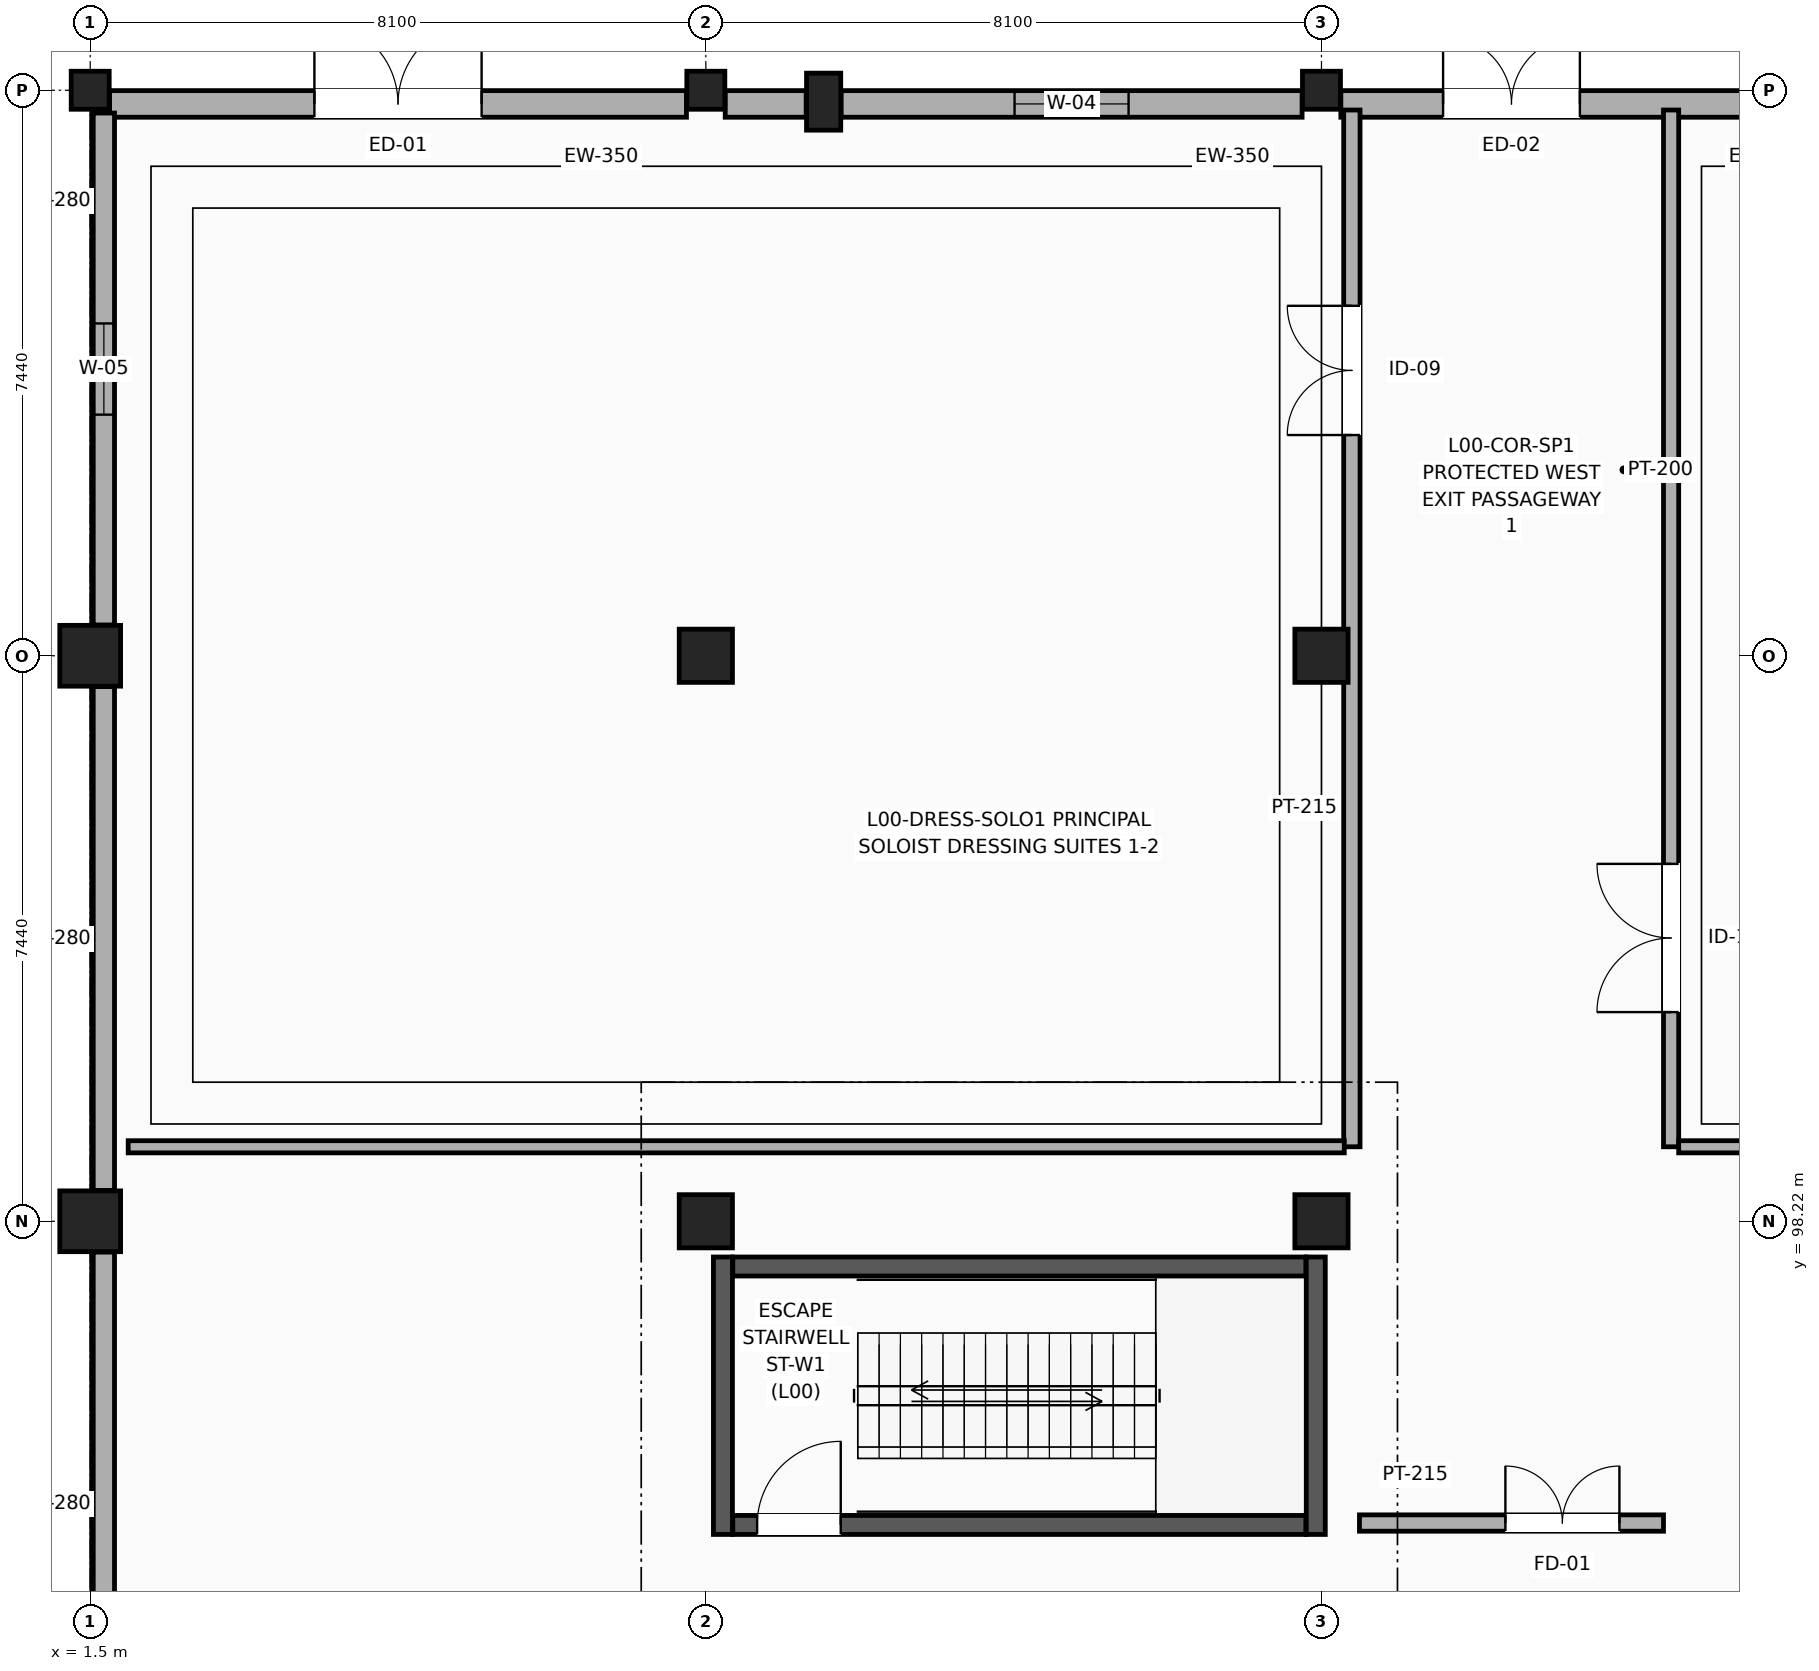
"""IFC4 building model, lengths in metres.
Left out: names, types, materials, properties, quantities, classifications, styles, units other than length and angle.
Written with IfcOpenShell. Run it as: python <this file> out.ifc"""

import sys

from ifc_helpers import new_model, si_unit, direction, frame, frame_2d, origin, origin_2d, place, context, subcontext, project, spatial, rectangle, extrude, element, fill, save


model = new_model("IFC4")
c1 = context("Model", 3, precision=1e-05, world=origin(), true_north=direction((0.0, 1.0)))
c2 = subcontext(c1, "Body", "Model", "MODEL_VIEW")
j1 = project(units=[si_unit("LENGTHUNIT", "METRE"), si_unit("PLANEANGLEUNIT", "RADIAN")], contexts=[c1])
p1 = place(None, origin())
s1 = spatial("IfcSite", under=j1, at=p1, CompositionType="ELEMENT")
p2 = place(p1, origin())
s2 = spatial("IfcBuilding", under=s1, at=p2, CompositionType="ELEMENT")
p3 = place(p2, origin())
s3 = spatial("IfcBuildingStorey", under=s2, at=p3, CompositionType="ELEMENT", Elevation=0.0)
p4 = place(p3, frame((11.15, 112.95, 0.0), z_axis=(0.0, 0.0, 1.0), x_axis=(1.0, 0.0, 0.0)))
e1 = element("IfcColumn", 1, at=p4, inside=s3, PredefinedType="PILASTER", context=c2, shape_type="SweptSolid", body=[
    extrude(rectangle(XDim=0.45, YDim=0.75, at=origin_2d()), origin(), (0.0, 0.0, 1.0), 5.4),
])
for number, where, z_axis, x_axis in (
    (2, (1.5, 98.22, 0.0), (0.0, 0.0, 1.0), (1.0, 0.0, 0.0)),
    (3, (1.5, 105.66, 0.0), (0.0, 0.0, 1.0), (1.0, 0.0, 0.0)),
):
    element("IfcColumn", number, at=place(p3, frame(where, z_axis=z_axis, x_axis=x_axis)), inside=s3, PredefinedType="COLUMN", context=c2, shape_type="SweptSolid", body=[
        extrude(rectangle(XDim=0.8, YDim=0.8, at=origin_2d()), origin(), (0.0, 0.0, 1.0), 5.4),
    ])
p5 = place(p3, frame((1.5, 113.1, 0.0), z_axis=(0.0, 0.0, 1.0), x_axis=(1.0, 0.0, 0.0)))
e4 = element("IfcColumn", 4, at=p5, inside=s3, PredefinedType="COLUMN", context=c2, shape_type="SweptSolid", body=[
    extrude(rectangle(XDim=0.5, YDim=0.5, at=origin_2d()), origin(), (0.0, 0.0, 1.0), 5.4),
])
for number, where, z_axis, x_axis in (
    (5, (9.6, 98.22, 0.0), (0.0, 0.0, 1.0), (1.0, 0.0, 0.0)),
    (6, (9.6, 105.66, 0.0), (0.0, 0.0, 1.0), (1.0, 0.0, 0.0)),
):
    element("IfcColumn", number, at=place(p3, frame(where, z_axis=z_axis, x_axis=x_axis)), inside=s3, PredefinedType="COLUMN", context=c2, shape_type="SweptSolid", body=[
        extrude(rectangle(XDim=0.7, YDim=0.7, at=origin_2d()), origin(), (0.0, 0.0, 1.0), 5.4),
    ])
p6 = place(p3, frame((9.6, 113.1, 0.0), z_axis=(0.0, 0.0, 1.0), x_axis=(1.0, 0.0, 0.0)))
e7 = element("IfcColumn", 7, at=p6, inside=s3, PredefinedType="COLUMN", context=c2, shape_type="SweptSolid", body=[
    extrude(rectangle(XDim=0.5, YDim=0.5, at=origin_2d()), origin(), (0.0, 0.0, 1.0), 5.4),
])
for number, where, z_axis, x_axis in (
    (8, (17.7, 98.22, 0.0), (0.0, 0.0, 1.0), (1.0, 0.0, 0.0)),
    (9, (17.7, 105.66, 0.0), (0.0, 0.0, 1.0), (1.0, 0.0, 0.0)),
):
    element("IfcColumn", number, at=place(p3, frame(where, z_axis=z_axis, x_axis=x_axis)), inside=s3, PredefinedType="COLUMN", context=c2, shape_type="SweptSolid", body=[
        extrude(rectangle(XDim=0.7, YDim=0.7, at=origin_2d()), origin(), (0.0, 0.0, 1.0), 5.4),
    ])
p7 = place(p3, frame((17.7, 113.1, 0.0), z_axis=(0.0, 0.0, 1.0), x_axis=(1.0, 0.0, 0.0)))
e10 = element("IfcColumn", 10, at=p7, inside=s3, PredefinedType="COLUMN", context=c2, shape_type="SweptSolid", body=[
    extrude(rectangle(XDim=0.5, YDim=0.5, at=origin_2d()), origin(), (0.0, 0.0, 1.0), 5.4),
])
p8 = place(p3, frame((1.755, 112.92, 0.0), z_axis=(0.0, 0.0, 1.0), x_axis=(1.0, 0.0, 0.0)))
e11 = element("IfcWall", 11, at=p8, inside=s3, PredefinedType="SOLIDWALL", context=c2, shape_type="SweptSolid", body=[
    extrude(rectangle(XDim=7.59, YDim=0.35, at=frame_2d((3.795, 0.0))), origin(), (0.0, 0.0, 1.0), 4.137),
])
p9 = place(p8, frame((2.695, 0.0, 0.0)))
e12 = element("IfcOpeningElement", 12, at=p9, cuts=e11, PredefinedType="OPENING", context=c2, shape_type="SweptSolid", body=[
    extrude(rectangle(XDim=2.2, YDim=2.6, at=frame_2d((1.1, 1.3))), frame((0.0, 0.185, 0.0), z_axis=(0.0, -1.0, 0.0), x_axis=(1.0, 0.0, 0.0)), (0.0, 0.0, 1.0), 0.37),
])
p10 = place(p3, frame((11.38, 112.92, 0.0), z_axis=(0.0, 0.0, 1.0), x_axis=(1.0, 0.0, 0.0)))
e13 = element("IfcWall", 13, at=p10, inside=s3, PredefinedType="SOLIDWALL", context=c2, shape_type="SweptSolid", body=[
    extrude(rectangle(XDim=6.065, YDim=0.35, at=frame_2d((3.033, 0.0))), origin(), (0.0, 0.0, 1.0), 4.137),
])
p11 = place(p10, frame((2.282, 0.0, 0.9)))
e14 = element("IfcOpeningElement", 14, at=p11, cuts=e13, PredefinedType="OPENING", context=c2, shape_type="SweptSolid", body=[
    extrude(rectangle(XDim=1.5, YDim=1.8, at=frame_2d((0.75, 0.9))), frame((0.0, 0.185, 0.0), z_axis=(0.0, -1.0, 0.0), x_axis=(1.0, 0.0, 0.0)), (0.0, 0.0, 1.0), 0.37),
])
p12 = place(p3, frame((9.855, 112.92, 0.0), z_axis=(0.0, 0.0, 1.0), x_axis=(1.0, 0.0, 0.0)))
e15 = element("IfcWall", 15, at=p12, inside=s3, PredefinedType="SOLIDWALL", context=c2, shape_type="SweptSolid", body=[
    extrude(rectangle(XDim=1.065, YDim=0.35, at=frame_2d((0.532, 0.0))), origin(), (0.0, 0.0, 1.0), 4.137),
])
p13 = place(p3, frame((17.955, 112.92, 0.0), z_axis=(0.0, 0.0, 1.0), x_axis=(1.0, 0.0, 0.0)))
e16 = element("IfcWall", 16, at=p13, inside=s3, PredefinedType="SOLIDWALL", context=c2, shape_type="SweptSolid", body=[
    extrude(rectangle(XDim=7.59, YDim=0.35, at=frame_2d((3.795, 0.0))), origin(), (0.0, 0.0, 1.0), 4.137),
])
p14 = place(p13, frame((1.345, 0.0, 0.0)))
e17 = element("IfcOpeningElement", 17, at=p14, cuts=e16, PredefinedType="OPENING", context=c2, shape_type="SweptSolid", body=[
    extrude(rectangle(XDim=1.8, YDim=2.4, at=frame_2d((0.9, 1.2))), frame((0.0, 0.185, 0.0), z_axis=(0.0, -1.0, 0.0), x_axis=(1.0, 0.0, 0.0)), (0.0, 0.0, 1.0), 0.37),
])
for number, where, z_axis, x_axis in (
    (18, (1.68, 91.185, 0.0), (0.0, 0.0, 1.0), (0.0, 1.0, 0.0)),
    (19, (1.68, 98.625, 0.0), (0.0, 0.0, 1.0), (0.0, 1.0, 0.0)),
):
    element("IfcWall", number, at=place(p3, frame(where, z_axis=z_axis, x_axis=x_axis)), inside=s3, PredefinedType="SOLIDWALL", context=c2, shape_type="SweptSolid", body=[
        extrude(rectangle(XDim=6.63, YDim=0.28, at=frame_2d((3.315, 0.0))), origin(), (0.0, 0.0, 1.0), 4.787),
    ])
p15 = place(p3, frame((1.68, 106.065, 0.0), z_axis=(0.0, 0.0, 1.0), x_axis=(0.0, 1.0, 0.0)))
e20 = element("IfcWall", 20, at=p15, inside=s3, PredefinedType="SOLIDWALL", context=c2, shape_type="SweptSolid", body=[
    extrude(rectangle(XDim=6.735, YDim=0.28, at=frame_2d((3.368, 0.0))), origin(), (0.0, 0.0, 1.0), 4.787),
])
p16 = place(p15, frame((2.767, 0.0, 0.95)))
e21 = element("IfcOpeningElement", 21, at=p16, cuts=e20, PredefinedType="OPENING", context=c2, shape_type="SweptSolid", body=[
    extrude(rectangle(XDim=1.2, YDim=1.8, at=frame_2d((0.6, 0.9))), frame((0.0, 0.15, 0.0), z_axis=(0.0, -1.0, 0.0), x_axis=(1.0, 0.0, 0.0)), (0.0, 0.0, 1.0), 0.3),
])
p17 = place(p3, frame((9.955, 94.225, 0.0), z_axis=(0.0, 0.0, 1.0), x_axis=(1.0, 0.0, 0.0)))
e22 = element("IfcWall", 22, at=p17, inside=s3, PredefinedType="SHEAR", context=c2, shape_type="SweptSolid", body=[
    extrude(rectangle(XDim=7.54, YDim=0.25, at=frame_2d((3.77, 0.0))), origin(), (0.0, 0.0, 1.0), 5.105),
])
p18 = place(p17, frame((0.32, 0.0, 0.0)))
e23 = element("IfcOpeningElement", 23, at=p18, cuts=e22, PredefinedType="OPENING", context=c2, shape_type="SweptSolid", body=[
    extrude(rectangle(XDim=1.1, YDim=2.2, at=frame_2d((0.55, 1.1))), frame((0.0, 0.135, 0.0), z_axis=(0.0, -1.0, 0.0), x_axis=(1.0, 0.0, 0.0)), (0.0, 0.0, 1.0), 0.27),
])
p19 = place(p3, frame((9.955, 97.625, 0.0), z_axis=(0.0, 0.0, 1.0), x_axis=(1.0, 0.0, 0.0)))
e24 = element("IfcWall", 24, at=p19, inside=s3, PredefinedType="SHEAR", context=c2, shape_type="SweptSolid", body=[
    extrude(rectangle(XDim=7.54, YDim=0.25, at=frame_2d((3.77, 0.0))), origin(), (0.0, 0.0, 1.0), 5.105),
])
for number, where, z_axis, x_axis in (
    (25, (9.825, 94.1, 0.0), (0.0, 0.0, 1.0), (0.0, 1.0, 0.0)),
    (26, (17.625, 94.1, 0.0), (0.0, 0.0, 1.0), (0.0, 1.0, 0.0)),
):
    element("IfcWall", number, at=place(p3, frame(where, z_axis=z_axis, x_axis=x_axis)), inside=s3, PredefinedType="SHEAR", context=c2, shape_type="SweptSolid", body=[
        extrude(rectangle(XDim=3.65, YDim=0.25, at=frame_2d((1.825, 0.0))), origin(), (0.0, 0.0, 1.0), 5.105),
    ])
p20 = place(p3, frame((18.2, 94.25, 0.0), z_axis=(0.0, 0.0, 1.0), x_axis=(1.0, 0.0, 0.0)))
e27 = element("IfcWall", 27, at=p20, inside=s3, PredefinedType="PARTITIONING", context=c2, shape_type="SweptSolid", body=[
    extrude(rectangle(XDim=4.0, YDim=0.215, at=frame_2d((2.0, 0.0))), origin(), (0.0, 0.0, 1.0), 4.637),
])
p21 = place(p20, frame((1.92, 0.0, 0.0)))
e28 = element("IfcOpeningElement", 28, at=p21, cuts=e27, PredefinedType="OPENING", context=c2, shape_type="SweptSolid", body=[
    extrude(rectangle(XDim=1.5, YDim=2.2, at=frame_2d((0.75, 1.1))), frame((0.0, 0.117, 0.0), z_axis=(0.0, -1.0, 0.0), x_axis=(1.0, 0.0, 0.0)), (0.0, 0.0, 1.0), 0.235),
])
p22 = place(p3, frame((18.1, 99.2, 0.0), z_axis=(0.0, 0.0, 1.0), x_axis=(0.0, 1.0, 0.0)))
e29 = element("IfcWall", 29, at=p22, inside=s3, PredefinedType="PARTITIONING", context=c2, shape_type="SweptSolid", body=[
    extrude(rectangle(XDim=13.64, YDim=0.215, at=frame_2d((6.82, 0.0))), origin(), (0.0, 0.0, 1.0), 4.137),
])
p23 = place(p22, frame((9.364, 0.0, 0.0)))
e30 = element("IfcOpeningElement", 30, at=p23, cuts=e29, PredefinedType="OPENING", context=c2, shape_type="SweptSolid", body=[
    extrude(rectangle(XDim=1.7, YDim=2.35, at=frame_2d((0.85, 1.175))), frame((0.0, 0.117, 0.0), z_axis=(0.0, -1.0, 0.0), x_axis=(1.0, 0.0, 0.0)), (0.0, 0.0, 1.0), 0.235),
])
p24 = place(p3, frame((22.3, 99.2, 0.0), z_axis=(0.0, 0.0, 1.0), x_axis=(0.0, 1.0, 0.0)))
e31 = element("IfcWall", 31, at=p24, inside=s3, PredefinedType="PARTITIONING", context=c2, shape_type="SweptSolid", body=[
    extrude(rectangle(XDim=13.64, YDim=0.2, at=frame_2d((6.82, 0.0))), origin(), (0.0, 0.0, 1.0), 4.137),
])
p25 = place(p24, frame((1.772, 0.0, 0.0)))
e32 = element("IfcOpeningElement", 32, at=p25, cuts=e31, PredefinedType="OPENING", context=c2, shape_type="SweptSolid", body=[
    extrude(rectangle(XDim=1.95, YDim=2.45, at=frame_2d((0.975, 1.225))), frame((0.0, 0.11, 0.0), z_axis=(0.0, -1.0, 0.0), x_axis=(1.0, 0.0, 0.0)), (0.0, 0.0, 1.0), 0.22),
])
p26 = place(p3, frame((2.0, 99.2, 0.0), z_axis=(0.0, 0.0, 1.0), x_axis=(1.0, 0.0, 0.0)))
e33 = element("IfcWall", 33, at=p26, inside=s3, PredefinedType="PARTITIONING", context=c2, shape_type="SweptSolid", body=[
    extrude(rectangle(XDim=16.0, YDim=0.16, at=frame_2d((8.0, 0.0))), origin(), (0.0, 0.0, 1.0), 4.337),
])
p27 = place(p3, frame((22.4, 99.2, 0.0), z_axis=(0.0, 0.0, 1.0), x_axis=(1.0, 0.0, 0.0)))
e34 = element("IfcWall", 34, at=p27, inside=s3, PredefinedType="PARTITIONING", context=c2, shape_type="SweptSolid", body=[
    extrude(rectangle(XDim=11.2, YDim=0.16, at=frame_2d((5.6, 0.0))), origin(), (0.0, 0.0, 1.0), 4.337),
])
p28 = place(p9, origin())
e35 = element("IfcDoor", 35, at=p28, inside=s3, OperationType="DOUBLE_DOOR_SINGLE_SWING", PredefinedType="DOOR", context=c2, shape_type="SweptSolid", body=[
    extrude(rectangle(XDim=2.2, YDim=2.6, at=frame_2d((1.1, 1.3))), frame((0.0, 0.025, 0.0), z_axis=(0.0, -1.0, 0.0), x_axis=(1.0, 0.0, 0.0)), (0.0, 0.0, 1.0), 0.05),
])
fill(e12, e35)
p29 = place(p11, origin())
e36 = element("IfcWindow", 36, at=p29, inside=s3, PartitioningType="SINGLE_PANEL", PredefinedType="WINDOW", context=c2, shape_type="SweptSolid", body=[
    extrude(rectangle(XDim=1.5, YDim=1.8, at=frame_2d((0.75, 0.9))), frame((0.0, 0.03, 0.0), z_axis=(0.0, -1.0, 0.0), x_axis=(1.0, 0.0, 0.0)), (0.0, 0.0, 1.0), 0.06),
])
fill(e14, e36)
p30 = place(p14, origin())
e37 = element("IfcDoor", 37, at=p30, inside=s3, OperationType="DOUBLE_DOOR_SINGLE_SWING", PredefinedType="DOOR", context=c2, shape_type="SweptSolid", body=[
    extrude(rectangle(XDim=1.8, YDim=2.4, at=frame_2d((0.9, 1.2))), frame((0.0, 0.025, 0.0), z_axis=(0.0, -1.0, 0.0), x_axis=(1.0, 0.0, 0.0)), (0.0, 0.0, 1.0), 0.05),
])
fill(e17, e37)
p31 = place(p16, origin())
e38 = element("IfcWindow", 38, at=p31, inside=s3, PartitioningType="SINGLE_PANEL", PredefinedType="WINDOW", context=c2, shape_type="SweptSolid", body=[
    extrude(rectangle(XDim=1.2, YDim=1.8, at=frame_2d((0.6, 0.9))), frame((0.0, 0.03, 0.0), z_axis=(0.0, -1.0, 0.0), x_axis=(1.0, 0.0, 0.0)), (0.0, 0.0, 1.0), 0.06),
])
fill(e21, e38)
p32 = place(p18, origin())
e39 = element("IfcDoor", 39, at=p32, inside=s3, OperationType="SINGLE_SWING_RIGHT", PredefinedType="DOOR", context=c2, shape_type="SweptSolid", body=[
    extrude(rectangle(XDim=1.1, YDim=2.2, at=frame_2d((0.55, 1.1))), frame((0.0, 0.025, 0.0), z_axis=(0.0, -1.0, 0.0), x_axis=(1.0, 0.0, 0.0)), (0.0, 0.0, 1.0), 0.05),
])
fill(e23, e39)
p33 = place(p21, origin())
e40 = element("IfcDoor", 40, at=p33, inside=s3, OperationType="DOUBLE_DOOR_SINGLE_SWING", PredefinedType="DOOR", context=c2, shape_type="SweptSolid", body=[
    extrude(rectangle(XDim=1.5, YDim=2.2, at=frame_2d((0.75, 1.1))), frame((0.0, 0.025, 0.0), z_axis=(0.0, -1.0, 0.0), x_axis=(1.0, 0.0, 0.0)), (0.0, 0.0, 1.0), 0.05),
])
fill(e28, e40)
p34 = place(p23, origin())
e41 = element("IfcDoor", 41, at=p34, inside=s3, OperationType="DOUBLE_DOOR_SINGLE_SWING", PredefinedType="DOOR", context=c2, shape_type="SweptSolid", body=[
    extrude(rectangle(XDim=1.7, YDim=2.35, at=frame_2d((0.85, 1.175))), frame((0.0, 0.025, 0.0), z_axis=(0.0, -1.0, 0.0), x_axis=(1.0, 0.0, 0.0)), (0.0, 0.0, 1.0), 0.05),
])
fill(e30, e41)
p35 = place(p25, origin())
e42 = element("IfcDoor", 42, at=p35, inside=s3, OperationType="DOUBLE_DOOR_SINGLE_SWING", PredefinedType="DOOR", context=c2, shape_type="SweptSolid", body=[
    extrude(rectangle(XDim=1.95, YDim=2.45, at=frame_2d((0.975, 1.225))), frame((0.0, 0.025, 0.0), z_axis=(0.0, -1.0, 0.0), x_axis=(1.0, 0.0, 0.0)), (0.0, 0.0, 1.0), 0.05),
])
fill(e32, e42)
save(model, sys.argv[1])
